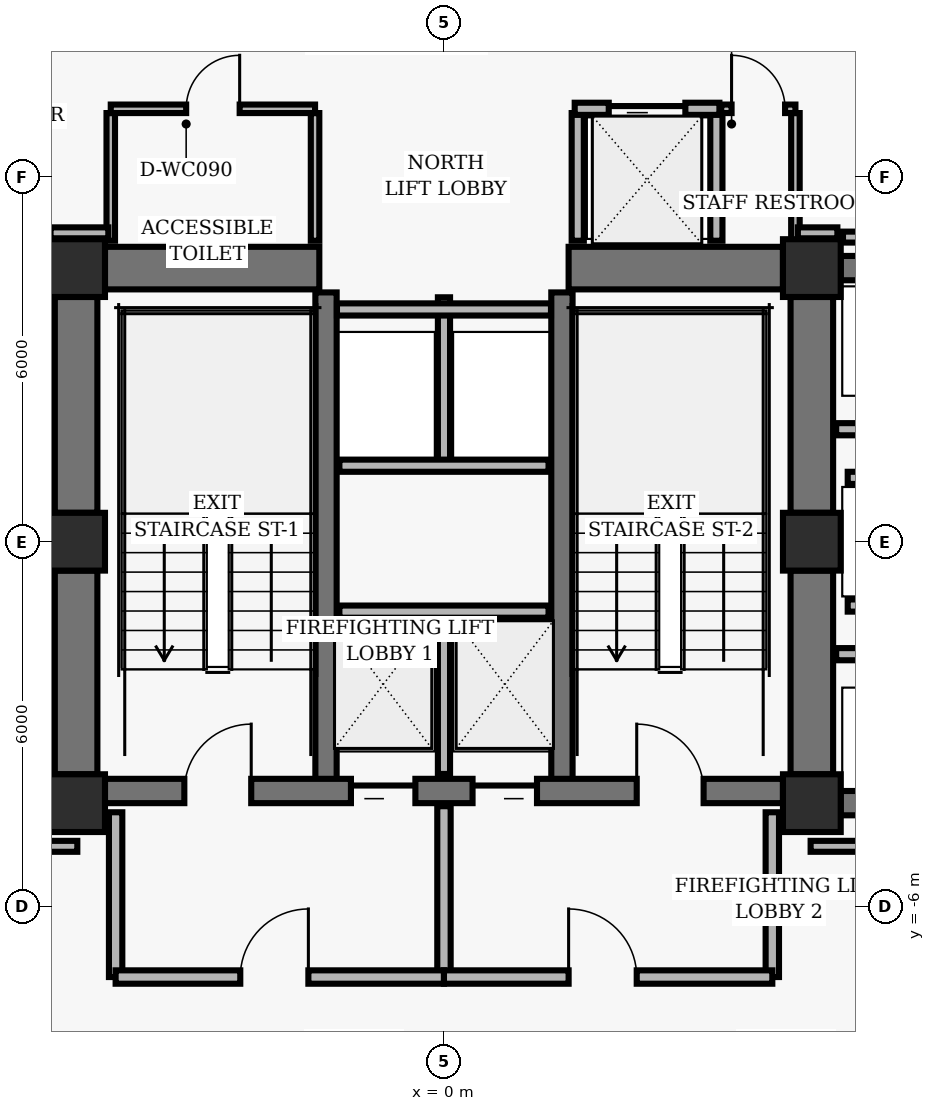
"""IFC4 building model, lengths in metres.
Left out: names, types, materials, properties, quantities, classifications, styles, units other than length and angle.
Written with IfcOpenShell. Run it as: python <this file> out.ifc"""

import sys

from ifc_helpers import new_model, si_unit, direction, frame, frame_2d, origin, origin_2d, place, context, subcontext, project, spatial, rectangle, hollow_rectangle, extrude, element, fill, save


model = new_model("IFC4")
c1 = context("Model", 3, precision=1e-05, world=origin(), true_north=direction((0.0, 1.0)))
c2 = subcontext(c1, "Body", "Model", "MODEL_VIEW")
j1 = project(units=[si_unit("LENGTHUNIT", "METRE"), si_unit("PLANEANGLEUNIT", "RADIAN")], contexts=[c1])
p1 = place(None, origin())
s1 = spatial("IfcSite", under=j1, at=p1, CompositionType="ELEMENT")
p2 = place(p1, origin())
s2 = spatial("IfcBuilding", under=s1, at=p2, CompositionType="ELEMENT")
p3 = place(p2, frame((0.0, 0.0, 82.56)))
s3 = spatial("IfcBuildingStorey", under=s2, at=p3, CompositionType="ELEMENT", Elevation=82.56)
for number, where, z_axis, x_axis in (
    (1, (-6.05, 4.5, 0.0), (0.0, 0.0, 1.0), (1.0, 0.0, 0.0)),
    (2, (6.05, 4.5, 0.0), (0.0, 0.0, 1.0), (1.0, 0.0, 0.0)),
    (3, (-6.05, 0.0, 0.0), (0.0, 0.0, 1.0), (1.0, 0.0, 0.0)),
    (4, (6.05, 0.0, 0.0), (0.0, 0.0, 1.0), (1.0, 0.0, 0.0)),
    (5, (-6.05, -4.3, 0.0), (0.0, 0.0, 1.0), (1.0, 0.0, 0.0)),
    (6, (6.05, -4.3, 0.0), (0.0, 0.0, 1.0), (1.0, 0.0, 0.0)),
):
    element("IfcColumn", number, at=place(p3, frame(where, z_axis=z_axis, x_axis=x_axis)), inside=s3, PredefinedType="COLUMN", context=c2, shape_type="SweptSolid", body=[
        extrude(hollow_rectangle(XDim=0.95, YDim=0.95, WallThickness=0.06, InnerFilletRadius=0.02, OuterFilletRadius=0.04, at=origin_2d()), origin(), (0.0, 0.0, 1.0), 3.04),
    ])
p4 = place(p3, frame((-6.05, 0.475, 0.0), z_axis=(0.0, 0.0, 1.0), x_axis=(0.0, 1.0, 0.0)))
e7 = element("IfcWall", 7, at=p4, inside=s3, PredefinedType="SHEAR", context=c2, shape_type="SweptSolid", body=[
    extrude(rectangle(XDim=3.55, YDim=0.7, at=frame_2d((1.775, 0.0))), origin(), (0.0, 0.0, 1.0), 2.788),
])
p5 = place(p3, frame((-6.05, -3.825, 0.0), z_axis=(0.0, 0.0, 1.0), x_axis=(0.0, 1.0, 0.0)))
e8 = element("IfcWall", 8, at=p5, inside=s3, PredefinedType="SHEAR", context=c2, shape_type="SweptSolid", body=[
    extrude(rectangle(XDim=3.35, YDim=0.7, at=frame_2d((1.675, 0.0))), origin(), (0.0, 0.0, 1.0), 2.788),
])
p6 = place(p3, frame((6.05, 0.475, 0.0), z_axis=(0.0, 0.0, 1.0), x_axis=(0.0, 1.0, 0.0)))
e9 = element("IfcWall", 9, at=p6, inside=s3, PredefinedType="SHEAR", context=c2, shape_type="SweptSolid", body=[
    extrude(rectangle(XDim=3.55, YDim=0.7, at=frame_2d((1.775, 0.0))), origin(), (0.0, 0.0, 1.0), 2.788),
])
p7 = place(p3, frame((6.05, -3.825, 0.0), z_axis=(0.0, 0.0, 1.0), x_axis=(0.0, 1.0, 0.0)))
e10 = element("IfcWall", 10, at=p7, inside=s3, PredefinedType="SHEAR", context=c2, shape_type="SweptSolid", body=[
    extrude(rectangle(XDim=3.35, YDim=0.7, at=frame_2d((1.675, 0.0))), origin(), (0.0, 0.0, 1.0), 2.788),
])
for number, where, z_axis, x_axis in (
    (11, (-1.94, -4.1, 0.0), (0.0, 0.0, 1.0), (0.0, 1.0, 0.0)),
    (12, (1.94, -4.1, 0.0), (0.0, 0.0, 1.0), (0.0, 1.0, 0.0)),
):
    element("IfcWall", number, at=place(p3, frame(where, z_axis=z_axis, x_axis=x_axis)), inside=s3, PredefinedType="SHEAR", context=c2, shape_type="SweptSolid", body=[
        extrude(rectangle(XDim=8.2, YDim=0.35, at=frame_2d((4.1, 0.0))), origin(), (0.0, 0.0, 1.0), 2.788),
    ])
p8 = place(p3, frame((-5.575, -4.1, 0.0), z_axis=(0.0, 0.0, 1.0), x_axis=(1.0, 0.0, 0.0)))
e13 = element("IfcWall", 13, at=p8, inside=s3, PredefinedType="SHEAR", context=c2, shape_type="SweptSolid", body=[
    extrude(rectangle(XDim=11.15, YDim=0.4, at=frame_2d((5.575, 0.0))), origin(), (0.0, 0.0, 1.0), 2.788),
])
p9 = place(p8, frame((1.305, 0.0, 0.0)))
e14 = element("IfcOpeningElement", 14, at=p9, cuts=e13, PredefinedType="OPENING", context=c2, shape_type="SweptSolid", body=[
    extrude(rectangle(XDim=1.1, YDim=2.04, at=frame_2d((0.55, 1.02))), frame((0.0, 0.21, 0.0), z_axis=(0.0, -1.0, 0.0), x_axis=(1.0, 0.0, 0.0)), (0.0, 0.0, 1.0), 0.42),
])
p10 = place(p8, frame((8.745, 0.0, 0.0)))
e15 = element("IfcOpeningElement", 15, at=p10, cuts=e13, PredefinedType="OPENING", context=c2, shape_type="SweptSolid", body=[
    extrude(rectangle(XDim=1.1, YDim=2.04, at=frame_2d((0.55, 1.02))), frame((0.0, 0.21, 0.0), z_axis=(0.0, -1.0, 0.0), x_axis=(1.0, 0.0, 0.0)), (0.0, 0.0, 1.0), 0.42),
])
p11 = place(p8, frame((4.045, 0.0, 0.0)))
e16 = element("IfcOpeningElement", 16, at=p11, cuts=e13, PredefinedType="OPENING", context=c2, shape_type="SweptSolid", body=[
    extrude(rectangle(XDim=1.06, YDim=2.04, at=frame_2d((0.53, 1.02))), frame((0.0, 0.21, 0.0), z_axis=(0.0, -1.0, 0.0), x_axis=(1.0, 0.0, 0.0)), (0.0, 0.0, 1.0), 0.42),
])
p12 = place(p8, frame((6.045, 0.0, 0.0)))
e17 = element("IfcOpeningElement", 17, at=p12, cuts=e13, PredefinedType="OPENING", context=c2, shape_type="SweptSolid", body=[
    extrude(rectangle(XDim=1.06, YDim=2.04, at=frame_2d((0.53, 1.02))), frame((0.0, 0.21, 0.0), z_axis=(0.0, -1.0, 0.0), x_axis=(1.0, 0.0, 0.0)), (0.0, 0.0, 1.0), 0.42),
])
for number, where, z_axis, x_axis in (
    (18, (-5.575, 4.5, 0.0), (0.0, 0.0, 1.0), (1.0, 0.0, 0.0)),
    (19, (2.05, 4.5, 0.0), (0.0, 0.0, 1.0), (1.0, 0.0, 0.0)),
):
    element("IfcWall", number, at=place(p3, frame(where, z_axis=z_axis, x_axis=x_axis)), inside=s3, PredefinedType="SHEAR", context=c2, shape_type="SweptSolid", body=[
        extrude(rectangle(XDim=3.525, YDim=0.7, at=frame_2d((1.762, 0.0))), origin(), (0.0, 0.0, 1.0), 2.788),
    ])
for number, where, z_axis, x_axis in (
    (20, (6.525, 4.5, 0.0), (0.0, 0.0, 1.0), (1.0, 0.0, 0.0)),
    (21, (6.525, -4.3, 0.0), (0.0, 0.0, 1.0), (1.0, 0.0, 0.0)),
):
    element("IfcWall", number, at=place(p3, frame(where, z_axis=z_axis, x_axis=x_axis)), inside=s3, PredefinedType="SHEAR", context=c2, shape_type="SweptSolid", body=[
        extrude(rectangle(XDim=1.95, YDim=0.4, at=frame_2d((0.975, 0.0))), origin(), (0.0, 0.0, 1.0), 2.788),
    ])
p13 = place(p3, frame((0.0, -3.82, 0.0), z_axis=(0.0, 0.0, 1.0), x_axis=(0.0, 1.0, 0.0)))
e22 = element("IfcWall", 22, at=p13, inside=s3, PredefinedType="PARTITIONING", context=c2, shape_type="SweptSolid", body=[
    extrude(rectangle(XDim=2.67, YDim=0.2, at=frame_2d((1.335, 0.0))), origin(), (0.0, 0.0, 1.0), 2.763),
])
p14 = place(p3, frame((-1.72, -1.15, 0.0), z_axis=(0.0, 0.0, 1.0), x_axis=(1.0, 0.0, 0.0)))
e23 = element("IfcWall", 23, at=p14, inside=s3, PredefinedType="PARTITIONING", context=c2, shape_type="SweptSolid", body=[
    extrude(rectangle(XDim=3.44, YDim=0.2, at=frame_2d((1.72, 0.0))), origin(), (0.0, 0.0, 1.0), 2.763),
])
for number, where, z_axis, x_axis in (
    (24, (-5.4, -7.16, 0.0), (0.0, 0.0, 1.0), (0.0, 1.0, 0.0)),
    (25, (5.4, -7.16, 0.0), (0.0, 0.0, 1.0), (0.0, 1.0, 0.0)),
):
    element("IfcWall", number, at=place(p3, frame(where, z_axis=z_axis, x_axis=x_axis)), inside=s3, PredefinedType="PARTITIONING", context=c2, shape_type="SweptSolid", body=[
        extrude(rectangle(XDim=2.71, YDim=0.22, at=frame_2d((1.355, 0.0))), origin(), (0.0, 0.0, 1.0), 2.763),
    ])
p15 = place(p3, frame((0.0, -7.16, 0.0), z_axis=(0.0, 0.0, 1.0), x_axis=(0.0, 1.0, 0.0)))
e26 = element("IfcWall", 26, at=p15, inside=s3, PredefinedType="PARTITIONING", context=c2, shape_type="SweptSolid", body=[
    extrude(rectangle(XDim=2.81, YDim=0.22, at=frame_2d((1.405, 0.0))), origin(), (0.0, 0.0, 1.0), 2.763),
])
p16 = place(p3, frame((-5.4, -7.16, 0.0), z_axis=(0.0, 0.0, 1.0), x_axis=(1.0, 0.0, 0.0)))
e27 = element("IfcWall", 27, at=p16, inside=s3, PredefinedType="PARTITIONING", context=c2, shape_type="SweptSolid", body=[
    extrude(rectangle(XDim=5.4, YDim=0.22, at=frame_2d((2.7, 0.0))), origin(), (0.0, 0.0, 1.0), 2.763),
])
p17 = place(p16, frame((2.05, 0.0, 0.0)))
e28 = element("IfcOpeningElement", 28, at=p17, cuts=e27, PredefinedType="OPENING", context=c2, shape_type="SweptSolid", body=[
    extrude(rectangle(XDim=1.12, YDim=2.02, at=frame_2d((0.56, 1.01))), frame((0.0, 0.12, 0.0), z_axis=(0.0, -1.0, 0.0), x_axis=(1.0, 0.0, 0.0)), (0.0, 0.0, 1.0), 0.24),
])
p18 = place(p3, frame((0.0, -7.16, 0.0), z_axis=(0.0, 0.0, 1.0), x_axis=(1.0, 0.0, 0.0)))
e29 = element("IfcWall", 29, at=p18, inside=s3, PredefinedType="PARTITIONING", context=c2, shape_type="SweptSolid", body=[
    extrude(rectangle(XDim=5.4, YDim=0.22, at=frame_2d((2.7, 0.0))), origin(), (0.0, 0.0, 1.0), 2.763),
])
p19 = place(p18, frame((2.05, 0.0, 0.0)))
e30 = element("IfcOpeningElement", 30, at=p19, cuts=e29, PredefinedType="OPENING", context=c2, shape_type="SweptSolid", body=[
    extrude(rectangle(XDim=1.12, YDim=2.02, at=frame_2d((0.56, 1.01))), frame((0.0, 0.12, 0.0), z_axis=(0.0, -1.0, 0.0), x_axis=(1.0, 0.0, 0.0)), (0.0, 0.0, 1.0), 0.24),
])
p20 = place(p3, frame((0.0, 1.25, 0.0), z_axis=(0.0, 0.0, 1.0), x_axis=(0.0, 1.0, 0.0)))
e31 = element("IfcWall", 31, at=p20, inside=s3, PredefinedType="PARTITIONING", context=c2, shape_type="SweptSolid", body=[
    extrude(rectangle(XDim=2.77, YDim=0.2, at=frame_2d((1.385, 0.0))), origin(), (0.0, 0.0, 1.0), 2.763),
])
p21 = place(p3, frame((-1.72, 1.25, 0.0), z_axis=(0.0, 0.0, 1.0), x_axis=(1.0, 0.0, 0.0)))
e32 = element("IfcWall", 32, at=p21, inside=s3, PredefinedType="PARTITIONING", context=c2, shape_type="SweptSolid", body=[
    extrude(rectangle(XDim=3.44, YDim=0.2, at=frame_2d((1.72, 0.0))), origin(), (0.0, 0.0, 1.0), 2.763),
])
p22 = place(p3, frame((-1.76, 3.82, 0.0), z_axis=(0.0, 0.0, 1.0), x_axis=(1.0, 0.0, 0.0)))
e33 = element("IfcWall", 33, at=p22, inside=s3, PredefinedType="PARTITIONING", context=c2, shape_type="SweptSolid", body=[
    extrude(rectangle(XDim=3.52, YDim=0.2, at=frame_2d((1.76, 0.0))), origin(), (0.0, 0.0, 1.0), 2.763),
])
for number, where, z_axis, x_axis in (
    (34, (2.2, 4.95, 0.0), (0.0, 0.0, 1.0), (0.0, 1.0, 0.0)),
    (35, (4.48, 4.95, 0.0), (0.0, 0.0, 1.0), (0.0, 1.0, 0.0)),
):
    element("IfcWall", number, at=place(p3, frame(where, z_axis=z_axis, x_axis=x_axis)), inside=s3, PredefinedType="PARTITIONING", context=c2, shape_type="SweptSolid", body=[
        extrude(rectangle(XDim=2.1, YDim=0.2, at=frame_2d((1.05, 0.0))), origin(), (0.0, 0.0, 1.0), 2.763),
    ])
p23 = place(p3, frame((2.15, 7.12, 0.0), z_axis=(0.0, 0.0, 1.0), x_axis=(1.0, 0.0, 0.0)))
e36 = element("IfcWall", 36, at=p23, inside=s3, PredefinedType="PARTITIONING", context=c2, shape_type="SweptSolid", body=[
    extrude(rectangle(XDim=2.38, YDim=0.2, at=frame_2d((1.19, 0.0))), origin(), (0.0, 0.0, 1.0), 2.763),
])
p24 = place(p23, frame((0.56, 0.0, 0.0)))
e37 = element("IfcOpeningElement", 37, at=p24, cuts=e36, PredefinedType="OPENING", context=c2, shape_type="SweptSolid", body=[
    extrude(rectangle(XDim=1.26, YDim=2.06, at=frame_2d((0.63, 1.03))), frame((0.0, 0.11, 0.0), z_axis=(0.0, -1.0, 0.0), x_axis=(1.0, 0.0, 0.0)), (0.0, 0.0, 1.0), 0.22),
])
for number, where, z_axis, x_axis in (
    (38, (-5.48, 4.95, 0.0), (0.0, 0.0, 1.0), (0.0, 1.0, 0.0)),
    (39, (-2.12, 4.95, 0.0), (0.0, 0.0, 1.0), (0.0, 1.0, 0.0)),
):
    element("IfcWall", number, at=place(p3, frame(where, z_axis=z_axis, x_axis=x_axis)), inside=s3, PredefinedType="PARTITIONING", context=c2, shape_type="SweptSolid", body=[
        extrude(rectangle(XDim=2.1, YDim=0.14, at=frame_2d((1.05, 0.0))), origin(), (0.0, 0.0, 1.0), 2.763),
    ])
p25 = place(p3, frame((-5.48, 7.12, 0.0), z_axis=(0.0, 0.0, 1.0), x_axis=(1.0, 0.0, 0.0)))
e40 = element("IfcWall", 40, at=p25, inside=s3, PredefinedType="PARTITIONING", context=c2, shape_type="SweptSolid", body=[
    extrude(rectangle(XDim=3.36, YDim=0.14, at=frame_2d((1.68, 0.0))), origin(), (0.0, 0.0, 1.0), 2.763),
])
p26 = place(p25, frame((1.24, 0.0, 0.0)))
e41 = element("IfcOpeningElement", 41, at=p26, cuts=e40, PredefinedType="OPENING", context=c2, shape_type="SweptSolid", body=[
    extrude(rectangle(XDim=0.88, YDim=2.02, at=frame_2d((0.44, 1.01))), frame((0.0, 0.08, 0.0), z_axis=(0.0, -1.0, 0.0), x_axis=(1.0, 0.0, 0.0)), (0.0, 0.0, 1.0), 0.16),
])
p27 = place(p3, frame((5.78, 4.95, 0.0), z_axis=(0.0, 0.0, 1.0), x_axis=(0.0, 1.0, 0.0)))
e42 = element("IfcWall", 42, at=p27, inside=s3, PredefinedType="PARTITIONING", context=c2, shape_type="SweptSolid", body=[
    extrude(rectangle(XDim=2.1, YDim=0.14, at=frame_2d((1.05, 0.0))), origin(), (0.0, 0.0, 1.0), 2.763),
])
p28 = place(p3, frame((4.56, 7.12, 0.0), z_axis=(0.0, 0.0, 1.0), x_axis=(1.0, 0.0, 0.0)))
e43 = element("IfcWall", 43, at=p28, inside=s3, PredefinedType="PARTITIONING", context=c2, shape_type="SweptSolid", body=[
    extrude(rectangle(XDim=1.22, YDim=0.14, at=frame_2d((0.61, 0.0))), origin(), (0.0, 0.0, 1.0), 2.763),
])
p29 = place(p28, frame((0.17, 0.0, 0.0)))
e44 = element("IfcOpeningElement", 44, at=p29, cuts=e43, PredefinedType="OPENING", context=c2, shape_type="SweptSolid", body=[
    extrude(rectangle(XDim=0.88, YDim=2.02, at=frame_2d((0.44, 1.01))), frame((0.0, 0.08, 0.0), z_axis=(0.0, -1.0, 0.0), x_axis=(1.0, 0.0, 0.0)), (0.0, 0.0, 1.0), 0.16),
])
for number, where, z_axis, x_axis in (
    (45, (6.45, -1.85, 0.0), (0.0, 0.0, 1.0), (1.0, 0.0, 0.0)),
    (46, (6.45, 1.85, 0.0), (0.0, 0.0, 1.0), (1.0, 0.0, 0.0)),
):
    element("IfcWall", number, at=place(p3, frame(where, z_axis=z_axis, x_axis=x_axis)), inside=s3, PredefinedType="PARTITIONING", context=c2, shape_type="SweptSolid", body=[
        extrude(rectangle(XDim=2.1, YDim=0.2, at=frame_2d((1.05, 0.0))), origin(), (0.0, 0.0, 1.0), 2.763),
    ])
for number, where, z_axis, x_axis in (
    (47, (6.64, -1.05, 0.0), (0.0, 0.0, 1.0), (1.0, 0.0, 0.0)),
    (48, (6.64, 1.05, 0.0), (0.0, 0.0, 1.0), (1.0, 0.0, 0.0)),
):
    element("IfcWall", number, at=place(p3, frame(where, z_axis=z_axis, x_axis=x_axis)), inside=s3, PredefinedType="PARTITIONING", context=c2, shape_type="SweptSolid", body=[
        extrude(rectangle(XDim=1.91, YDim=0.2, at=frame_2d((0.955, 0.0))), origin(), (0.0, 0.0, 1.0), 2.763),
    ])
for number, where, z_axis, x_axis in (
    (49, (-9.37, -5.01, 0.0), (0.0, 0.0, 1.0), (1.0, 0.0, 0.0)),
    (50, (6.03, -5.01, 0.0), (0.0, 0.0, 1.0), (1.0, 0.0, 0.0)),
):
    element("IfcWall", number, at=place(p3, frame(where, z_axis=z_axis, x_axis=x_axis)), inside=s3, PredefinedType="PARTITIONING", context=c2, shape_type="SweptSolid", body=[
        extrude(rectangle(XDim=3.34, YDim=0.18, at=frame_2d((1.67, 0.0))), origin(), (0.0, 0.0, 1.0), 2.763),
    ])
p30 = place(p3, frame((9.37, 5.01, 0.0), z_axis=(0.0, 0.0, 1.0), x_axis=(-1.0, 0.0, 0.0)))
e51 = element("IfcWall", 51, at=p30, inside=s3, PredefinedType="PARTITIONING", context=c2, shape_type="SweptSolid", body=[
    extrude(rectangle(XDim=2.808, YDim=0.18, at=frame_2d((1.404, 0.0))), origin(), (0.0, 0.0, 1.0), 2.763),
])
p31 = place(p3, frame((6.47, 5.08, 0.0), z_axis=(0.0, 0.0, 1.0), x_axis=(-1.0, 0.0, 0.0)))
e52 = element("IfcWall", 52, at=p31, inside=s3, PredefinedType="PARTITIONING", context=c2, shape_type="SweptSolid", body=[
    extrude(rectangle(XDim=0.65, YDim=0.18, at=frame_2d((0.325, 0.0))), origin(), (0.0, 0.0, 1.0), 2.763),
])
p32 = place(p3, frame((-5.52, 5.08, 0.0), z_axis=(0.0, 0.0, 1.0), x_axis=(-1.0, 0.0, 0.0)))
e53 = element("IfcWall", 53, at=p32, inside=s3, PredefinedType="PARTITIONING", context=c2, shape_type="SweptSolid", body=[
    extrude(rectangle(XDim=0.95, YDim=0.18, at=frame_2d((0.475, 0.0))), origin(), (0.0, 0.0, 1.0), 2.763),
])
p33 = place(p9, origin())
e54 = element("IfcDoor", 54, at=p33, inside=s3, OperationType="SINGLE_SWING_RIGHT", PredefinedType="DOOR", context=c2, shape_type="SweptSolid", body=[
    extrude(rectangle(XDim=1.1, YDim=2.04, at=frame_2d((0.55, 1.02))), frame((0.0, 0.025, 0.0), z_axis=(0.0, -1.0, 0.0), x_axis=(1.0, 0.0, 0.0)), (0.0, 0.0, 1.0), 0.05),
])
fill(e14, e54)
p34 = place(p10, origin())
e55 = element("IfcDoor", 55, at=p34, inside=s3, OperationType="SINGLE_SWING_LEFT", PredefinedType="DOOR", context=c2, shape_type="SweptSolid", body=[
    extrude(rectangle(XDim=1.1, YDim=2.04, at=frame_2d((0.55, 1.02))), frame((0.0, 0.025, 0.0), z_axis=(0.0, -1.0, 0.0), x_axis=(1.0, 0.0, 0.0)), (0.0, 0.0, 1.0), 0.05),
])
fill(e15, e55)
p35 = place(p11, origin())
e56 = element("IfcDoor", 56, at=p35, inside=s3, OperationType="SLIDING_TO_LEFT", PredefinedType="DOOR", context=c2, shape_type="SweptSolid", body=[
    extrude(rectangle(XDim=1.06, YDim=2.04, at=frame_2d((0.53, 1.02))), frame((0.0, 0.025, 0.0), z_axis=(0.0, -1.0, 0.0), x_axis=(1.0, 0.0, 0.0)), (0.0, 0.0, 1.0), 0.05),
])
fill(e16, e56)
p36 = place(p12, origin())
e57 = element("IfcDoor", 57, at=p36, inside=s3, OperationType="SLIDING_TO_RIGHT", PredefinedType="DOOR", context=c2, shape_type="SweptSolid", body=[
    extrude(rectangle(XDim=1.06, YDim=2.04, at=frame_2d((0.53, 1.02))), frame((0.0, 0.025, 0.0), z_axis=(0.0, -1.0, 0.0), x_axis=(1.0, 0.0, 0.0)), (0.0, 0.0, 1.0), 0.05),
])
fill(e17, e57)
p37 = place(p17, origin())
e58 = element("IfcDoor", 58, at=p37, inside=s3, OperationType="SINGLE_SWING_RIGHT", PredefinedType="DOOR", context=c2, shape_type="SweptSolid", body=[
    extrude(rectangle(XDim=1.12, YDim=2.02, at=frame_2d((0.56, 1.01))), frame((0.0, 0.025, 0.0), z_axis=(0.0, -1.0, 0.0), x_axis=(1.0, 0.0, 0.0)), (0.0, 0.0, 1.0), 0.05),
])
fill(e28, e58)
p38 = place(p19, origin())
e59 = element("IfcDoor", 59, at=p38, inside=s3, OperationType="SINGLE_SWING_LEFT", PredefinedType="DOOR", context=c2, shape_type="SweptSolid", body=[
    extrude(rectangle(XDim=1.12, YDim=2.02, at=frame_2d((0.56, 1.01))), frame((0.0, 0.025, 0.0), z_axis=(0.0, -1.0, 0.0), x_axis=(1.0, 0.0, 0.0)), (0.0, 0.0, 1.0), 0.05),
])
fill(e30, e59)
p39 = place(p24, origin())
e60 = element("IfcDoor", 60, at=p39, inside=s3, OperationType="SLIDING_TO_LEFT", PredefinedType="DOOR", context=c2, shape_type="SweptSolid", body=[
    extrude(rectangle(XDim=1.26, YDim=2.06, at=frame_2d((0.63, 1.03))), frame((0.0, 0.025, 0.0), z_axis=(0.0, -1.0, 0.0), x_axis=(1.0, 0.0, 0.0)), (0.0, 0.0, 1.0), 0.05),
])
fill(e37, e60)
p40 = place(p26, origin())
e61 = element("IfcDoor", 61, at=p40, inside=s3, OperationType="SINGLE_SWING_RIGHT", PredefinedType="DOOR", context=c2, shape_type="SweptSolid", body=[
    extrude(rectangle(XDim=0.88, YDim=2.02, at=frame_2d((0.44, 1.01))), frame((0.0, 0.025, 0.0), z_axis=(0.0, -1.0, 0.0), x_axis=(1.0, 0.0, 0.0)), (0.0, 0.0, 1.0), 0.05),
])
fill(e41, e61)
p41 = place(p29, origin())
e62 = element("IfcDoor", 62, at=p41, inside=s3, OperationType="SINGLE_SWING_LEFT", PredefinedType="DOOR", context=c2, shape_type="SweptSolid", body=[
    extrude(rectangle(XDim=0.88, YDim=2.02, at=frame_2d((0.44, 1.01))), frame((0.0, 0.025, 0.0), z_axis=(0.0, -1.0, 0.0), x_axis=(1.0, 0.0, 0.0)), (0.0, 0.0, 1.0), 0.05),
])
fill(e44, e62)
save(model, sys.argv[1])
